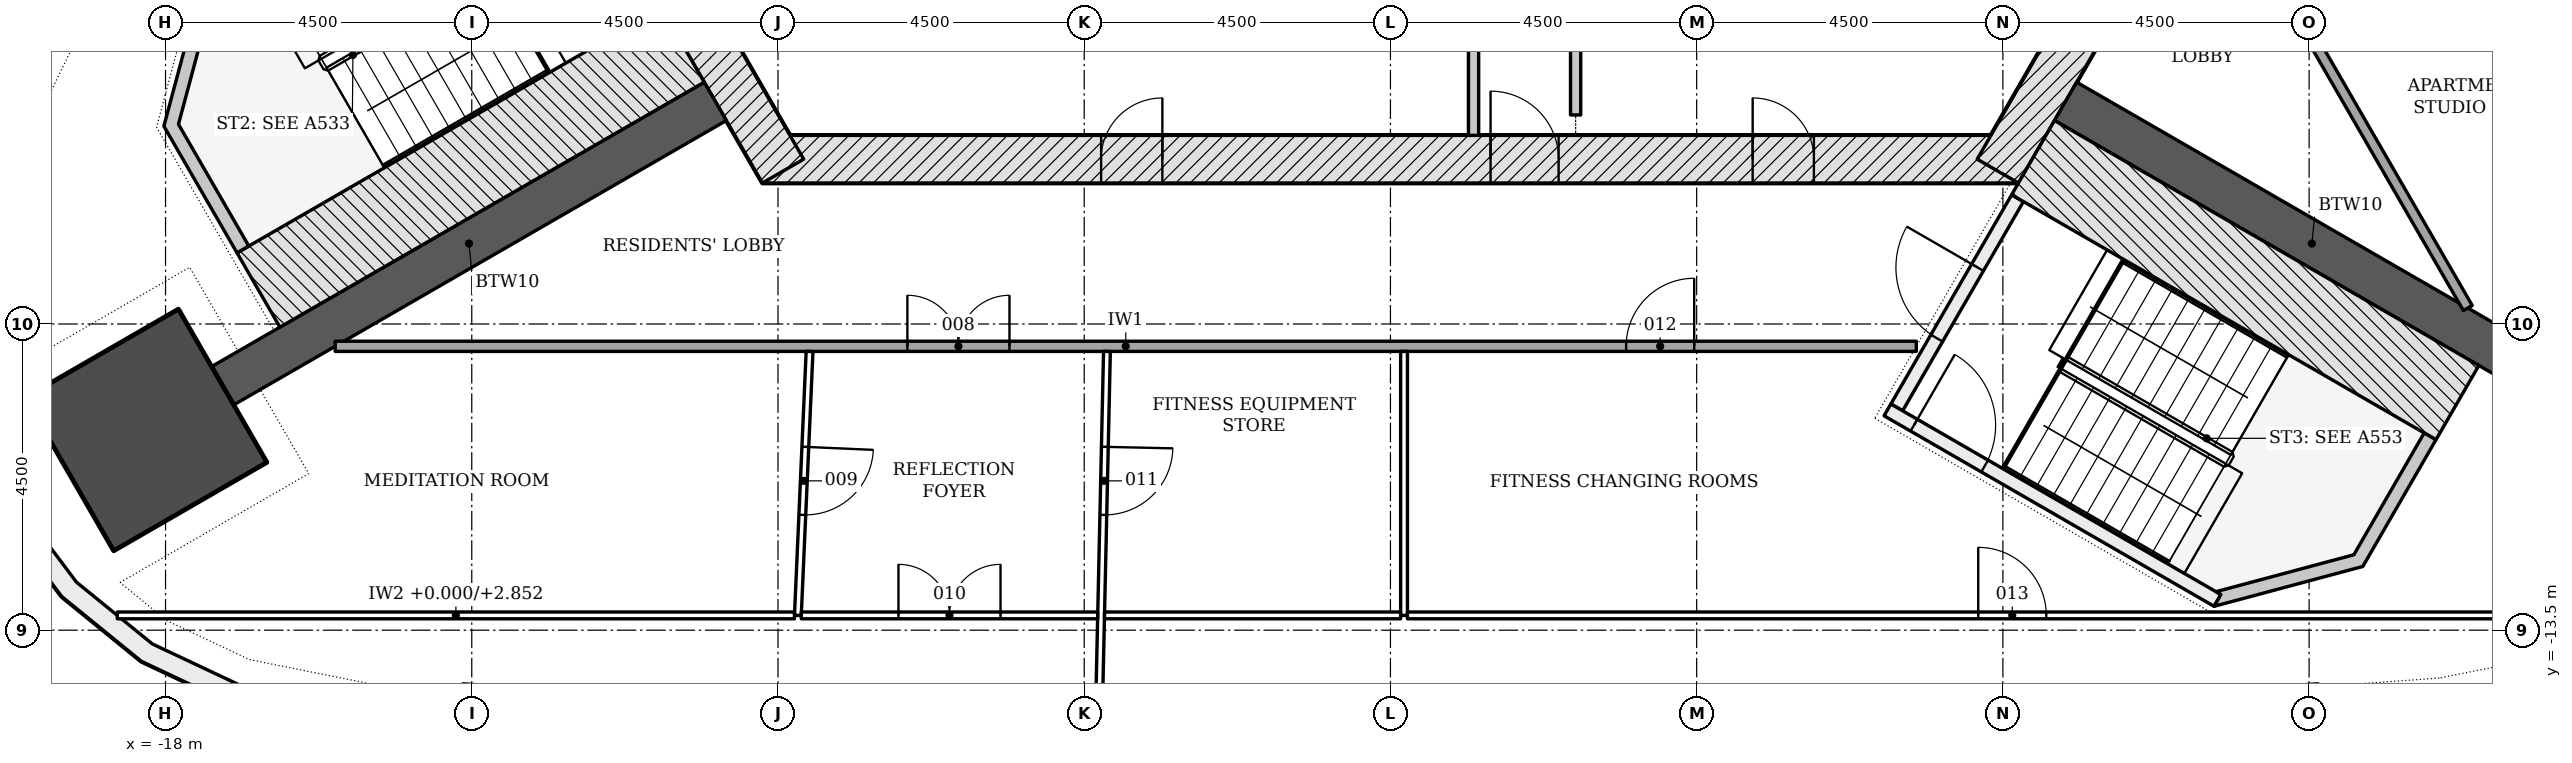
"""IFC4 building model, lengths in metres.
Left out: names, types, materials, properties, quantities, classifications, styles, units other than length and angle.
Written with IfcOpenShell. Run it as: python <this file> out.ifc"""

import sys

from ifc_helpers import new_model, si_unit, direction, frame, frame_2d, origin, origin_2d, place, context, subcontext, project, spatial, polyline, rectangle, outline, extrude, element, fill, save


model = new_model("IFC4")
c1 = context("Model", 3, precision=1e-05, world=origin(), true_north=direction((0.0, 1.0)))
c2 = subcontext(c1, "Body", "Model", "MODEL_VIEW")
j1 = project(units=[si_unit("LENGTHUNIT", "METRE"), si_unit("PLANEANGLEUNIT", "RADIAN")], contexts=[c1])
p1 = place(None, origin())
s1 = spatial("IfcSite", under=j1, at=p1, CompositionType="ELEMENT")
p2 = place(p1, origin())
s2 = spatial("IfcBuilding", under=s1, at=p2, CompositionType="ELEMENT")
p3 = place(p2, frame((0.0, 0.0, 222.0)))
s3 = spatial("IfcBuildingStorey", under=s2, at=p3, CompositionType="ELEMENT", Elevation=222.0)
p4 = place(p3, frame((-9.229, -6.578, -0.2), z_axis=(0.0, 0.0, 1.0), x_axis=(1.0, 0.0, 0.0)))
e1 = element("IfcWall", 1, at=p4, inside=s3, PredefinedType="SHEAR", context=c2, shape_type="SweptSolid", body=[
    extrude(rectangle(XDim=18.458, YDim=0.7, at=frame_2d((9.229, 0.0))), origin(), (0.0, 0.0, 1.0), 3.6),
])
p5 = place(p4, frame((10.7, 0.0, 0.2)))
e2 = element("IfcOpeningElement", 2, at=p5, cuts=e1, PredefinedType="OPENING", context=c2, shape_type="SweptSolid", body=[
    extrude(rectangle(XDim=1.0, YDim=2.1, at=frame_2d((0.5, 1.05))), frame((0.0, 0.36, 0.0), z_axis=(0.0, -1.0, 0.0), x_axis=(1.0, 0.0, 0.0)), (0.0, 0.0, 1.0), 0.72),
])
p6 = place(p4, frame((4.977, 0.0, 0.2)))
e3 = element("IfcOpeningElement", 3, at=p6, cuts=e1, PredefinedType="OPENING", context=c2, shape_type="SweptSolid", body=[
    extrude(rectangle(XDim=0.9, YDim=2.1, at=frame_2d((0.45, 1.05))), frame((0.0, 0.36, 0.0), z_axis=(0.0, -1.0, 0.0), x_axis=(1.0, 0.0, 0.0)), (0.0, 0.0, 1.0), 0.72),
])
p7 = place(p4, frame((14.552, 0.0, 0.2)))
e4 = element("IfcOpeningElement", 4, at=p7, cuts=e1, PredefinedType="OPENING", context=c2, shape_type="SweptSolid", body=[
    extrude(rectangle(XDim=0.9, YDim=2.1, at=frame_2d((0.45, 1.05))), frame((0.0, 0.36, 0.0), z_axis=(0.0, -1.0, 0.0), x_axis=(1.0, 0.0, 0.0)), (0.0, 0.0, 1.0), 0.72),
])
for number, where, z_axis, x_axis in (
    (5, (8.926, -6.753, -0.2), (0.0, 0.0, 1.0), (0.5, 0.866, 0.0)),
    (6, (-10.311, -4.353, -0.2), (0.0, 0.0, 1.0), (0.5, -0.866, 0.0)),
):
    element("IfcWall", number, at=place(p3, frame(where, z_axis=z_axis, x_axis=x_axis)), inside=s3, PredefinedType="SHEAR", context=c2, shape_type="SweptSolid", body=[
        extrude(rectangle(XDim=2.771, YDim=0.7, at=frame_2d((1.386, 0.0))), origin(), (0.0, 0.0, 1.0), 3.6),
    ])
for number, where, z_axis, x_axis in (
    (7, (-9.922, -5.728, -0.2), (0.0, 0.0, 1.0), (-0.866, -0.5, 0.0)),
    (8, (9.922, -5.728, -0.2), (0.0, 0.0, 1.0), (0.866, -0.5, 0.0)),
):
    element("IfcWall", number, at=place(p3, frame(where, z_axis=z_axis, x_axis=x_axis)), inside=s3, PredefinedType="SHEAR", context=c2, shape_type="SweptSolid", body=[
        extrude(rectangle(XDim=8.359, YDim=0.65, at=frame_2d((4.179, 0.0))), origin(), (0.0, 0.0, 1.0), 3.6),
    ])
p8 = place(p3, frame((-18.286, -10.558, -0.2), z_axis=(0.0, 0.0, 1.0), x_axis=(-0.866025403784, -0.5, 0.0)))
e9 = element("IfcColumn", 9, at=p8, inside=s3, PredefinedType="COLUMN", context=c2, shape_type="SweptSolid", body=[
    extrude(rectangle(XDim=2.6, YDim=2.6, at=origin_2d()), origin(), (0.0, 0.0, 1.0), 3.6),
])
p9 = place(p3, origin())
e10 = element("IfcWall", 10, at=p9, inside=s3, PredefinedType="NOTDEFINED", context=c2, shape_type="SweptSolid", body=[
    extrude(outline(polyline([(-19.772, -4.162), (-20.656, -5.98), (-21.139, -7.411), (-21.265, -8.917), (-21.025, -10.408), (-20.434, -11.797), (-19.526, -13.004), (-18.354, -13.958), (-16.988, -14.602), (-15.507, -14.898), (-15.448, -14.604), (-16.893, -14.315), (-18.193, -13.702), (-19.308, -12.795), (-20.172, -11.646), (-20.735, -10.324), (-20.963, -8.905), (-20.844, -7.473), (-20.378, -6.094), (-19.502, -4.293), (-19.772, -4.162)])), origin(), (0.0, 0.0, 1.0), 3.3),
])
p10 = place(p3, origin())
e11 = element("IfcWall", 11, at=p10, inside=s3, PredefinedType="NOTDEFINED", context=c2, shape_type="SweptSolid", body=[
    extrude(outline(polyline([(13.49, -15.042), (15.507, -14.898), (16.988, -14.602), (18.354, -13.958), (19.526, -13.004), (20.434, -11.797), (21.025, -10.408), (21.265, -8.917), (21.139, -7.411), (20.656, -5.98), (19.772, -4.162), (19.502, -4.293), (20.378, -6.094), (20.844, -7.473), (20.963, -8.905), (20.735, -10.324), (20.172, -11.646), (19.308, -12.795), (18.193, -13.702), (16.893, -14.315), (15.467, -14.6), (13.469, -14.743), (13.49, -15.042)])), origin(), (0.0, 0.0, 1.0), 3.3),
])
p11 = place(p3, frame((1.221, 4.711, 0.0), z_axis=(0.0, 0.0, 1.0), x_axis=(0.0, -1.0, 0.0)))
e12 = element("IfcWall", 12, at=p11, inside=s3, PredefinedType="PARTITIONING", context=c2, shape_type="SweptSolid", body=[
    extrude(rectangle(XDim=10.939, YDim=0.15, at=frame_2d((5.47, 0.0))), origin(), (0.0, 0.0, 1.0), 3.4),
])
p12 = place(p11, frame((4.489, 0.0, 0.0)))
e13 = element("IfcOpeningElement", 13, at=p12, cuts=e12, PredefinedType="OPENING", context=c2, shape_type="SweptSolid", body=[
    extrude(rectangle(XDim=1.0, YDim=2.1, at=frame_2d((0.5, 1.05))), frame((0.0, 0.085, 0.0), z_axis=(0.0, -1.0, 0.0), x_axis=(1.0, 0.0, 0.0)), (0.0, 0.0, 1.0), 0.17),
])
p13 = place(p11, frame((0.671, 0.0, 0.0)))
e14 = element("IfcOpeningElement", 14, at=p13, cuts=e12, PredefinedType="OPENING", context=c2, shape_type="SweptSolid", body=[
    extrude(rectangle(XDim=0.9, YDim=2.1, at=frame_2d((0.45, 1.05))), frame((0.0, 0.085, 0.0), z_axis=(0.0, -1.0, 0.0), x_axis=(1.0, 0.0, 0.0)), (0.0, 0.0, 1.0), 0.17),
])
p14 = place(p3, frame((2.721, -5.928, 0.0), z_axis=(0.0, 0.0, 1.0), x_axis=(0.0, 1.0, 0.0)))
e15 = element("IfcWall", 15, at=p14, inside=s3, PredefinedType="PARTITIONING", context=c2, shape_type="SweptSolid", body=[
    extrude(rectangle(XDim=8.041, YDim=0.15, at=frame_2d((4.021, 0.0))), origin(), (0.0, 0.0, 1.0), 3.4),
])
p15 = place(p14, frame((5.02, 0.0, 0.0)))
e16 = element("IfcOpeningElement", 16, at=p15, cuts=e15, PredefinedType="OPENING", context=c2, shape_type="SweptSolid", body=[
    extrude(rectangle(XDim=0.9, YDim=2.1, at=frame_2d((0.45, 1.05))), frame((0.0, 0.085, 0.0), z_axis=(0.0, -1.0, 0.0), x_axis=(1.0, 0.0, 0.0)), (0.0, 0.0, 1.0), 0.17),
])
p16 = place(p3, frame((-10.399, -4.901, -0.2), z_axis=(0.0, 0.0, 1.0), x_axis=(-0.866018442252, -0.500012057535, 0.0)))
e17 = element("IfcWall", 17, at=p16, inside=s3, PredefinedType="SHEAR", context=c2, shape_type="SweptSolid", body=[
    extrude(rectangle(XDim=7.2, YDim=1.261, at=frame_2d((3.6, 0.0))), origin(), (0.0, 0.0, 1.0), 3.6),
])
p17 = place(p3, frame((0.0, 0.0, -0.2)))
e18 = element("IfcWall", 18, at=p17, inside=s3, PredefinedType="SHEAR", context=c2, shape_type="SweptSolid", body=[
    extrude(outline(polyline([(-17.439, -3.907), (-18.025, -6.093), (-16.95, -7.955), (-16.777, -7.855), (-17.81, -6.065), (-17.267, -4.039), (-17.339, -4.081), (-17.339, -4.081), (-17.339, -4.081), (-17.339, -4.081), (-17.339, -4.081), (-17.339, -4.081), (-17.339, -4.081), (-17.339, -4.081), (-17.339, -4.081), (-17.339, -4.081), (-17.339, -4.081), (-17.339, -4.081), (-17.339, -4.081), (-17.339, -4.081), (-17.339, -4.081), (-17.339, -4.081), (-17.339, -4.081), (-17.439, -3.907)])), origin(), (0.0, 0.0, 1.0), 3.6),
])
p18 = place(p3, frame((7.44, -10.226, -0.2), z_axis=(0.0, 0.0, 1.0), x_axis=(0.500022077904, 0.866012656725, 0.0)))
e19 = element("IfcWall", 19, at=p18, inside=s3, PredefinedType="SHEAR", context=c2, shape_type="SweptSolid", body=[
    extrude(rectangle(XDim=3.55, YDim=0.2, at=frame_2d((1.775, 0.0))), origin(), (0.0, 0.0, 1.0), 3.6),
])
p19 = place(p18, frame((1.175, 0.0, 0.2)))
e20 = element("IfcOpeningElement", 20, at=p19, cuts=e19, PredefinedType="OPENING", context=c2, shape_type="SweptSolid", body=[
    extrude(rectangle(XDim=1.2, YDim=2.1, at=frame_2d((0.6, 1.05))), frame((0.0, 0.11, 0.0), z_axis=(0.0, -1.0, 0.0), x_axis=(1.0, 0.0, 0.0)), (0.0, 0.0, 1.0), 0.22),
])
p20 = place(p3, frame((7.304, -10.262, -0.2), z_axis=(0.0, 0.0, 1.0), x_axis=(0.866026594901, -0.49999793692, 0.0)))
e21 = element("IfcWall", 21, at=p20, inside=s3, PredefinedType="SHEAR", context=c2, shape_type="SweptSolid", body=[
    extrude(rectangle(XDim=5.6, YDim=0.2, at=frame_2d((2.8, 0.0))), origin(), (0.0, 0.0, 1.0), 3.6),
])
p21 = place(p20, frame((0.45, 0.0, 0.2)))
e22 = element("IfcOpeningElement", 22, at=p21, cuts=e21, PredefinedType="OPENING", context=c2, shape_type="SweptSolid", body=[
    extrude(rectangle(XDim=1.2, YDim=2.1, at=frame_2d((0.6, 1.05))), frame((0.0, 0.11, 0.0), z_axis=(0.0, -1.0, 0.0), x_axis=(1.0, 0.0, 0.0)), (0.0, 0.0, 1.0), 0.22),
])
p22 = place(p3, frame((9.444, -6.555, -0.2), z_axis=(0.0, 0.0, 1.0), x_axis=(0.866018442252, -0.500012057535, 0.0)))
e23 = element("IfcWall", 23, at=p22, inside=s3, PredefinedType="SHEAR", context=c2, shape_type="SweptSolid", body=[
    extrude(rectangle(XDim=7.2, YDim=1.261, at=frame_2d((3.6, 0.0))), origin(), (0.0, 0.0, 1.0), 3.6),
])
p23 = place(p3, frame((0.0, 0.0, -0.2)))
e24 = element("IfcWall", 24, at=p23, inside=s3, PredefinedType="SHEAR", context=c2, shape_type="SweptSolid", body=[
    extrude(outline(polyline([(12.104, -13.149), (14.289, -12.563), (15.364, -10.701), (15.191, -10.601), (14.157, -12.392), (12.132, -12.934), (12.204, -12.976), (12.204, -12.976), (12.204, -12.976), (12.204, -12.976), (12.204, -12.976), (12.204, -12.976), (12.204, -12.976), (12.204, -12.976), (12.204, -12.976), (12.204, -12.976), (12.204, -12.976), (12.204, -12.976), (12.204, -12.976), (12.204, -12.976), (12.204, -12.976), (12.204, -12.976), (12.204, -12.976), (12.104, -13.149)])), origin(), (0.0, 0.0, 1.0), 3.6),
])
p24 = place(p3, frame((15.832, -8.765, 0.0), z_axis=(0.0, 0.0, 1.0), x_axis=(-0.500009302692, 0.866020032806, 0.0)))
e25 = element("IfcWall", 25, at=p24, inside=s3, PredefinedType="PARTITIONING", context=c2, shape_type="SweptSolid", body=[
    extrude(rectangle(XDim=6.974, YDim=0.15, at=frame_2d((3.487, 0.0))), origin(), (0.0, 0.0, 1.0), 2.852),
])
p25 = place(p3, frame((-15.507, -9.328, 0.0), z_axis=(0.0, 0.0, 1.0), x_axis=(1.0, 0.0, 0.0)))
e26 = element("IfcWall", 26, at=p25, inside=s3, PredefinedType="PARTITIONING", context=c2, shape_type="SweptSolid", body=[
    extrude(rectangle(XDim=23.234, YDim=0.15, at=frame_2d((11.617, 0.0))), origin(), (0.0, 0.0, 1.0), 2.852),
])
p26 = place(p25, frame((8.408, 0.0, 0.0)))
e27 = element("IfcOpeningElement", 27, at=p26, cuts=e26, PredefinedType="OPENING", context=c2, shape_type="SweptSolid", body=[
    extrude(rectangle(XDim=1.5, YDim=2.1, at=frame_2d((0.75, 1.05))), frame((0.0, 0.085, 0.0), z_axis=(0.0, -1.0, 0.0), x_axis=(1.0, 0.0, 0.0)), (0.0, 0.0, 1.0), 0.17),
])
p27 = place(p25, frame((18.971, 0.0, 0.0)))
e28 = element("IfcOpeningElement", 28, at=p27, cuts=e26, PredefinedType="OPENING", context=c2, shape_type="SweptSolid", body=[
    extrude(rectangle(XDim=1.0, YDim=2.1, at=frame_2d((0.5, 1.05))), frame((0.0, 0.085, 0.0), z_axis=(0.0, -1.0, 0.0), x_axis=(1.0, 0.0, 0.0)), (0.0, 0.0, 1.0), 0.17),
])
p28 = place(p3, frame((-8.536, -9.403, 0.0), z_axis=(0.0, 0.0, 1.0), x_axis=(-0.044201203498, -0.999022649197, 0.0)))
e29 = element("IfcWall", 29, at=p28, inside=s3, PredefinedType="PARTITIONING", context=c2, shape_type="SweptSolid", body=[
    extrude(rectangle(XDim=3.883, YDim=0.1, at=frame_2d((1.941, 0.0))), origin(), (0.0, 0.0, 1.0), 3.4),
])
p29 = place(p28, frame((1.404, 0.0, 0.0)))
e30 = element("IfcOpeningElement", 30, at=p29, cuts=e29, PredefinedType="OPENING", context=c2, shape_type="SweptSolid", body=[
    extrude(rectangle(XDim=1.0, YDim=2.1, at=frame_2d((0.5, 1.05))), frame((0.0, 0.06, 0.0), z_axis=(0.0, -1.0, 0.0), x_axis=(1.0, 0.0, 0.0)), (0.0, 0.0, 1.0), 0.12),
])
p30 = place(p3, frame((-4.166, -9.403, 0.0), z_axis=(0.0, 0.0, 1.0), x_axis=(-0.022131761569, -0.999755062568, 0.0)))
e31 = element("IfcWall", 31, at=p30, inside=s3, PredefinedType="PARTITIONING", context=c2, shape_type="SweptSolid", body=[
    extrude(rectangle(XDim=21.952, YDim=0.1, at=frame_2d((10.976, 0.0))), origin(), (0.0, 0.0, 1.0), 2.847),
])
p31 = place(p30, frame((1.403, 0.0, 0.0)))
e32 = element("IfcOpeningElement", 32, at=p31, cuts=e31, PredefinedType="OPENING", context=c2, shape_type="SweptSolid", body=[
    extrude(rectangle(XDim=1.0, YDim=2.1, at=frame_2d((0.5, 1.05))), frame((0.0, 0.06, 0.0), z_axis=(0.0, -1.0, 0.0), x_axis=(1.0, 0.0, 0.0)), (0.0, 0.0, 1.0), 0.12),
])
p32 = place(p3, frame((0.2, -9.403, 0.0), z_axis=(0.0, 0.0, 1.0), x_axis=(0.0, -1.0, 0.0)))
e33 = element("IfcWall", 33, at=p32, inside=s3, PredefinedType="PARTITIONING", context=c2, shape_type="SweptSolid", body=[
    extrude(rectangle(XDim=3.879, YDim=0.1, at=frame_2d((1.939, 0.0))), origin(), (0.0, 0.0, 1.0), 3.4),
])
p33 = place(p3, frame((-18.709, -13.282, 0.0), z_axis=(0.0, 0.0, 1.0), x_axis=(1.0, 0.0, 0.0)))
e34 = element("IfcWall", 34, at=p33, inside=s3, PredefinedType="PARTITIONING", context=c2, shape_type="SweptSolid", body=[
    extrude(rectangle(XDim=9.951, YDim=0.1, at=frame_2d((4.976, 0.0))), origin(), (0.0, 0.0, 1.0), 2.852),
])
p34 = place(p3, frame((-8.658, -13.282, 0.0), z_axis=(0.0, 0.0, 1.0), x_axis=(1.0, 0.0, 0.0)))
e35 = element("IfcWall", 35, at=p34, inside=s3, PredefinedType="PARTITIONING", context=c2, shape_type="SweptSolid", body=[
    extrude(rectangle(XDim=4.356, YDim=0.1, at=frame_2d((2.178, 0.0))), origin(), (0.0, 0.0, 1.0), 2.852),
])
p35 = place(p34, frame((1.428, 0.0, 0.0)))
e36 = element("IfcOpeningElement", 36, at=p35, cuts=e35, PredefinedType="OPENING", context=c2, shape_type="SweptSolid", body=[
    extrude(rectangle(XDim=1.5, YDim=2.1, at=frame_2d((0.75, 1.05))), frame((0.0, 0.06, 0.0), z_axis=(0.0, -1.0, 0.0), x_axis=(1.0, 0.0, 0.0)), (0.0, 0.0, 1.0), 0.12),
])
p36 = place(p3, frame((-4.202, -13.282, 0.0), z_axis=(0.0, 0.0, 1.0), x_axis=(1.0, 0.0, 0.0)))
e37 = element("IfcWall", 37, at=p36, inside=s3, PredefinedType="PARTITIONING", context=c2, shape_type="SweptSolid", body=[
    extrude(rectangle(XDim=4.352, YDim=0.1, at=frame_2d((2.176, 0.0))), origin(), (0.0, 0.0, 1.0), 2.852),
])
p37 = place(p3, frame((0.25, -13.282, 0.0), z_axis=(0.0, 0.0, 1.0), x_axis=(1.0, 0.0, 0.0)))
e38 = element("IfcWall", 38, at=p37, inside=s3, PredefinedType="PARTITIONING", context=c2, shape_type="SweptSolid", body=[
    extrude(rectangle(XDim=18.459, YDim=0.1, at=frame_2d((9.229, 0.0))), origin(), (0.0, 0.0, 1.0), 2.852),
])
p38 = place(p37, frame((8.387, 0.0, 0.0)))
e39 = element("IfcOpeningElement", 39, at=p38, cuts=e38, PredefinedType="OPENING", context=c2, shape_type="SweptSolid", body=[
    extrude(rectangle(XDim=1.0, YDim=2.1, at=frame_2d((0.5, 1.05))), frame((0.0, 0.06, 0.0), z_axis=(0.0, -1.0, 0.0), x_axis=(1.0, 0.0, 0.0)), (0.0, 0.0, 1.0), 0.12),
])
p39 = place(p5, origin())
e40 = element("IfcDoor", 40, at=p39, inside=s3, OperationType="SINGLE_SWING_LEFT", PredefinedType="DOOR", context=c2, shape_type="SweptSolid", body=[
    extrude(rectangle(XDim=1.0, YDim=2.1, at=frame_2d((0.5, 1.05))), frame((0.0, 0.075, 0.0), z_axis=(0.0, -1.0, 0.0), x_axis=(1.0, 0.0, 0.0)), (0.0, 0.0, 1.0), 0.15),
])
fill(e2, e40)
p40 = place(p6, origin())
e41 = element("IfcDoor", 41, at=p40, inside=s3, OperationType="SINGLE_SWING_RIGHT", PredefinedType="DOOR", context=c2, shape_type="SweptSolid", body=[
    extrude(rectangle(XDim=0.9, YDim=2.1, at=frame_2d((0.45, 1.05))), frame((0.0, 0.075, 0.0), z_axis=(0.0, -1.0, 0.0), x_axis=(1.0, 0.0, 0.0)), (0.0, 0.0, 1.0), 0.15),
])
fill(e3, e41)
p41 = place(p7, origin())
e42 = element("IfcDoor", 42, at=p41, inside=s3, OperationType="SINGLE_SWING_LEFT", PredefinedType="DOOR", context=c2, shape_type="SweptSolid", body=[
    extrude(rectangle(XDim=0.9, YDim=2.1, at=frame_2d((0.45, 1.05))), frame((0.0, 0.075, 0.0), z_axis=(0.0, -1.0, 0.0), x_axis=(1.0, 0.0, 0.0)), (0.0, 0.0, 1.0), 0.15),
])
fill(e4, e42)
p42 = place(p19, origin())
e43 = element("IfcDoor", 43, at=p42, inside=s3, OperationType="SINGLE_SWING_RIGHT", PredefinedType="DOOR", context=c2, shape_type="SweptSolid", body=[
    extrude(rectangle(XDim=1.2, YDim=2.1, at=frame_2d((0.6, 1.05))), frame((0.0, 0.025, 0.0), z_axis=(0.0, -1.0, 0.0), x_axis=(1.0, 0.0, 0.0)), (0.0, 0.0, 1.0), 0.05),
])
fill(e20, e43)
p43 = place(p21, origin())
e44 = element("IfcDoor", 44, at=p43, inside=s3, OperationType="SINGLE_SWING_LEFT", PredefinedType="DOOR", context=c2, shape_type="SweptSolid", body=[
    extrude(rectangle(XDim=1.2, YDim=2.1, at=frame_2d((0.6, 1.05))), frame((0.0, 0.025, 0.0), z_axis=(0.0, -1.0, 0.0), x_axis=(1.0, 0.0, 0.0)), (0.0, 0.0, 1.0), 0.05),
])
fill(e22, e44)
p44 = place(p26, origin())
e45 = element("IfcDoor", 45, at=p44, inside=s3, OperationType="DOUBLE_DOOR_SINGLE_SWING", PredefinedType="DOOR", context=c2, shape_type="SweptSolid", body=[
    extrude(rectangle(XDim=1.5, YDim=2.1, at=frame_2d((0.75, 1.05))), frame((0.0, 0.025, 0.0), z_axis=(0.0, -1.0, 0.0), x_axis=(1.0, 0.0, 0.0)), (0.0, 0.0, 1.0), 0.05),
])
fill(e27, e45)
p45 = place(p29, origin())
e46 = element("IfcDoor", 46, at=p45, inside=s3, OperationType="SINGLE_SWING_LEFT", PredefinedType="DOOR", context=c2, shape_type="SweptSolid", body=[
    extrude(rectangle(XDim=1.0, YDim=2.1, at=frame_2d((0.5, 1.05))), frame((0.0, 0.025, 0.0), z_axis=(0.0, -1.0, 0.0), x_axis=(1.0, 0.0, 0.0)), (0.0, 0.0, 1.0), 0.05),
])
fill(e30, e46)
p46 = place(p35, origin())
e47 = element("IfcDoor", 47, at=p46, inside=s3, OperationType="DOUBLE_DOOR_SINGLE_SWING", PredefinedType="DOOR", context=c2, shape_type="SweptSolid", body=[
    extrude(rectangle(XDim=1.5, YDim=2.1, at=frame_2d((0.75, 1.05))), frame((0.0, 0.025, 0.0), z_axis=(0.0, -1.0, 0.0), x_axis=(1.0, 0.0, 0.0)), (0.0, 0.0, 1.0), 0.05),
])
fill(e36, e47)
p47 = place(p31, origin())
e48 = element("IfcDoor", 48, at=p47, inside=s3, OperationType="SINGLE_SWING_LEFT", PredefinedType="DOOR", context=c2, shape_type="SweptSolid", body=[
    extrude(rectangle(XDim=1.0, YDim=2.1, at=frame_2d((0.5, 1.05))), frame((0.0, 0.025, 0.0), z_axis=(0.0, -1.0, 0.0), x_axis=(1.0, 0.0, 0.0)), (0.0, 0.0, 1.0), 0.05),
])
fill(e32, e48)
p48 = place(p27, origin())
e49 = element("IfcDoor", 49, at=p48, inside=s3, OperationType="SINGLE_SWING_RIGHT", PredefinedType="DOOR", context=c2, shape_type="SweptSolid", body=[
    extrude(rectangle(XDim=1.0, YDim=2.1, at=frame_2d((0.5, 1.05))), frame((0.0, 0.025, 0.0), z_axis=(0.0, -1.0, 0.0), x_axis=(1.0, 0.0, 0.0)), (0.0, 0.0, 1.0), 0.05),
])
fill(e28, e49)
p49 = place(p38, origin())
e50 = element("IfcDoor", 50, at=p49, inside=s3, OperationType="SINGLE_SWING_LEFT", PredefinedType="DOOR", context=c2, shape_type="SweptSolid", body=[
    extrude(rectangle(XDim=1.0, YDim=2.1, at=frame_2d((0.5, 1.05))), frame((0.0, 0.025, 0.0), z_axis=(0.0, -1.0, 0.0), x_axis=(1.0, 0.0, 0.0)), (0.0, 0.0, 1.0), 0.05),
])
fill(e39, e50)
save(model, sys.argv[1])
